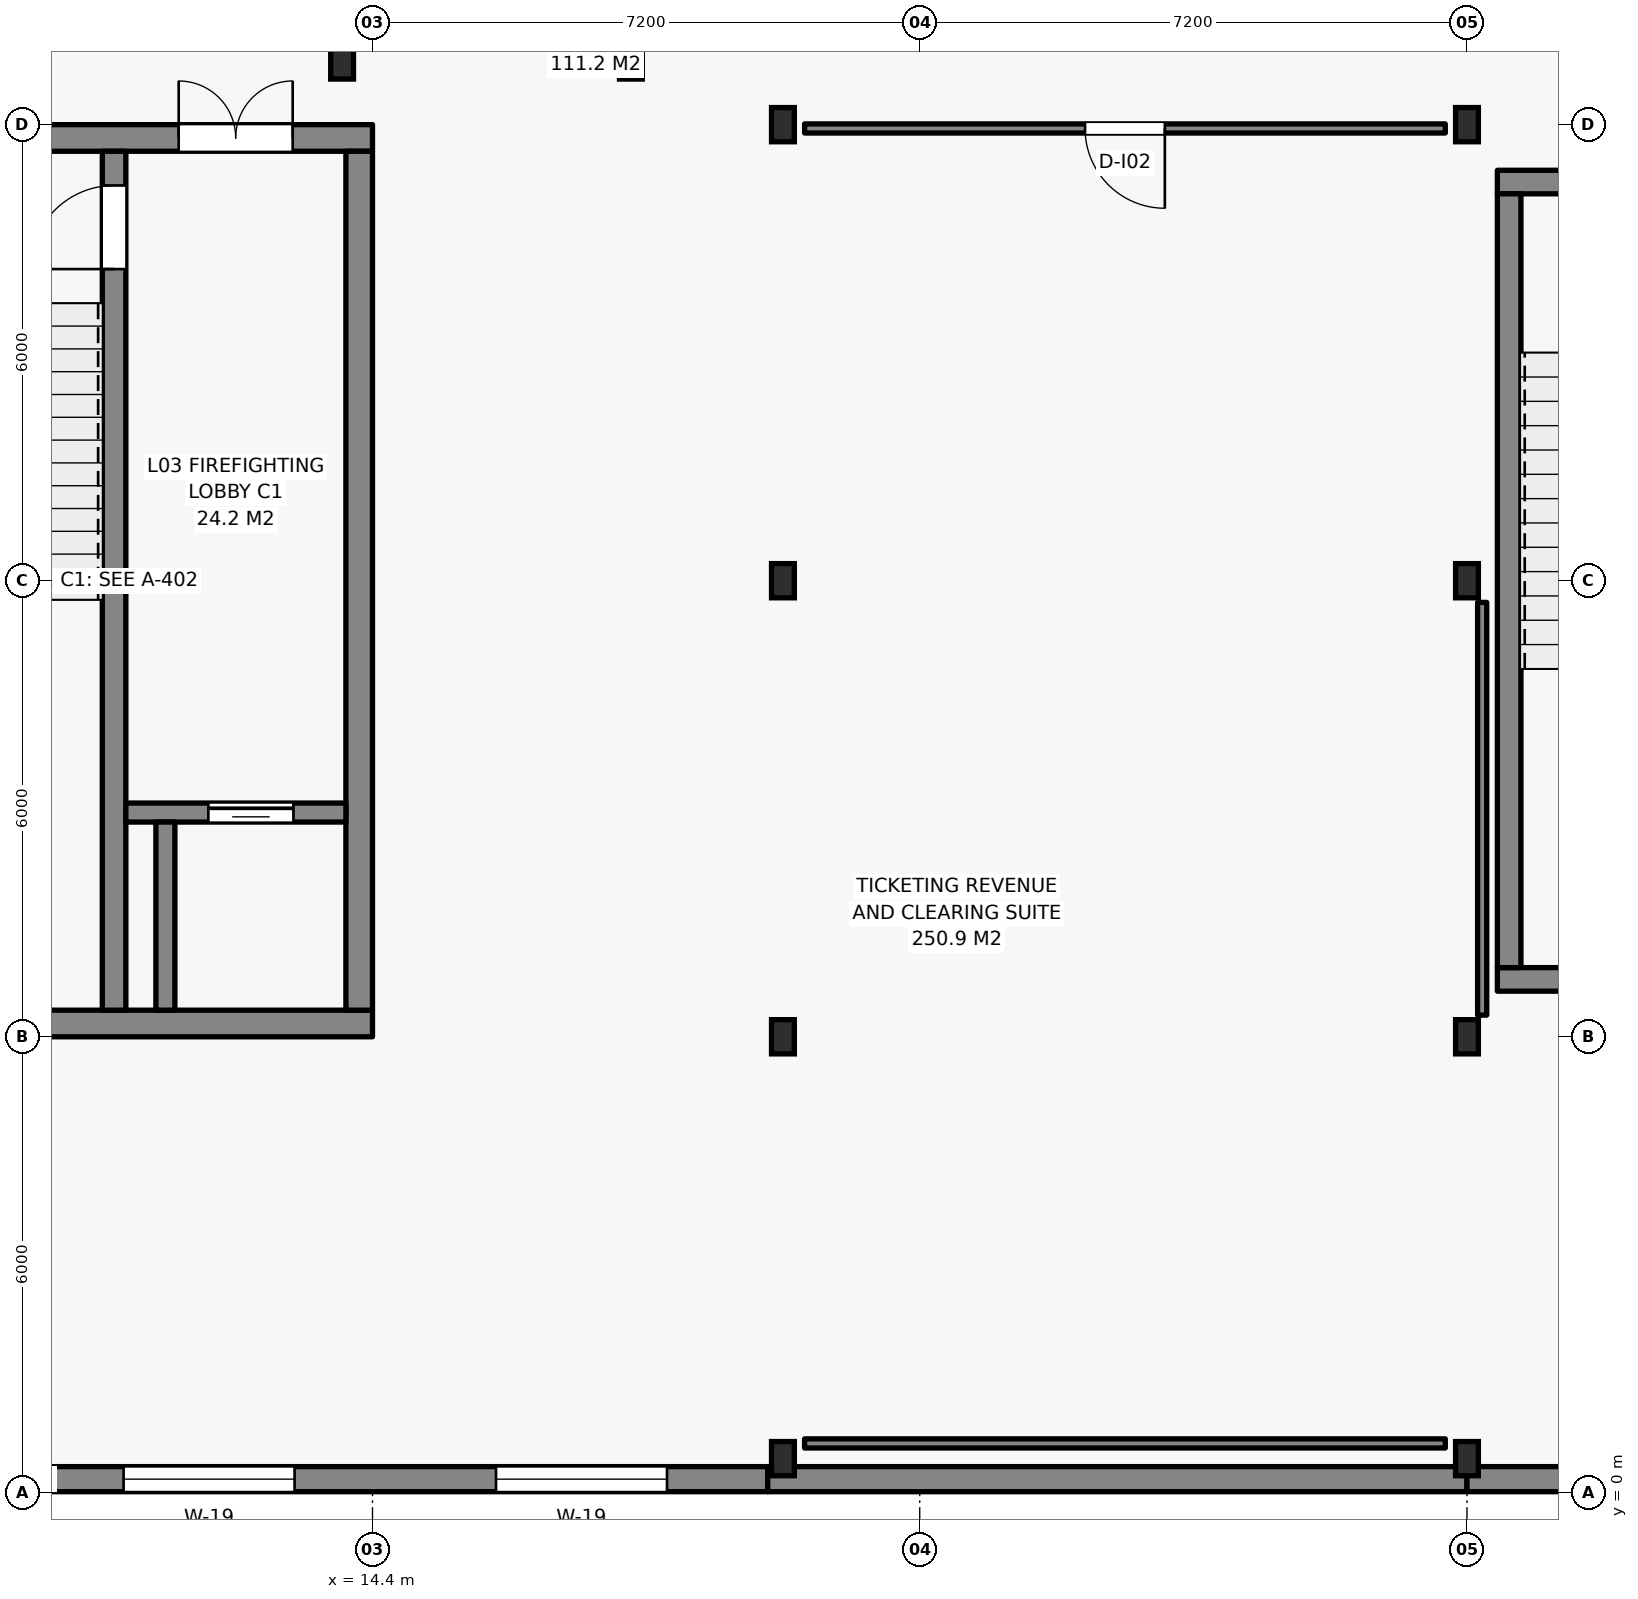
"""IFC4 building model, lengths in metres.
Left out: names, types, materials, properties, quantities, classifications, styles, units other than length and angle.
Written with IfcOpenShell. Run it as: python <this file> out.ifc"""

import sys

from ifc_helpers import new_model, si_unit, direction, frame, frame_2d, origin, origin_2d, place, context, subcontext, project, spatial, rectangle, i_section, extrude, element, fill, save


model = new_model("IFC4")
c1 = context("Model", 3, precision=1e-05, world=origin(), true_north=direction((0.0, 1.0)))
c2 = subcontext(c1, "Body", "Model", "MODEL_VIEW")
j1 = project(units=[si_unit("LENGTHUNIT", "METRE"), si_unit("PLANEANGLEUNIT", "RADIAN")], contexts=[c1])
p1 = place(None, origin())
s1 = spatial("IfcSite", under=j1, at=p1, CompositionType="ELEMENT")
p2 = place(p1, origin())
s2 = spatial("IfcBuilding", under=s1, at=p2, CompositionType="ELEMENT")
p3 = place(p2, frame((0.0, 0.0, 10.5)))
s3 = spatial("IfcBuildingStorey", under=s2, at=p3, CompositionType="ELEMENT", Elevation=10.5)
p4 = place(p3, frame((7.2, 6.175, 0.0), z_axis=(0.0, 0.0, 1.0), x_axis=(1.0, 0.0, 0.0)))
e1 = element("IfcWall", 1, at=p4, inside=s3, PredefinedType="SHEAR", context=c2, shape_type="SweptSolid", body=[
    extrude(rectangle(XDim=7.2, YDim=0.35, at=frame_2d((3.6, 0.0))), origin(), (0.0, 0.0, 1.0), 3.95),
])
p5 = place(p3, frame((7.2, 17.825, 0.0), z_axis=(0.0, 0.0, 1.0), x_axis=(1.0, 0.0, 0.0)))
e2 = element("IfcWall", 2, at=p5, inside=s3, PredefinedType="SHEAR", context=c2, shape_type="SweptSolid", body=[
    extrude(rectangle(XDim=7.2, YDim=0.35, at=frame_2d((3.6, 0.0))), origin(), (0.0, 0.0, 1.0), 3.95),
])
p6 = place(p5, frame((4.65, 0.0, 0.0)))
e3 = element("IfcOpeningElement", 3, at=p6, cuts=e2, PredefinedType="OPENING", context=c2, shape_type="SweptSolid", body=[
    extrude(rectangle(XDim=1.5, YDim=2.15, at=frame_2d((0.75, 1.075))), frame((0.0, 0.185, 0.0), z_axis=(0.0, -1.0, 0.0), x_axis=(1.0, 0.0, 0.0)), (0.0, 0.0, 1.0), 0.37),
])
p7 = place(p3, frame((14.225, 6.35, 0.0), z_axis=(0.0, 0.0, 1.0), x_axis=(0.0, 1.0, 0.0)))
e4 = element("IfcWall", 4, at=p7, inside=s3, PredefinedType="SHEAR", context=c2, shape_type="SweptSolid", body=[
    extrude(rectangle(XDim=11.3, YDim=0.35, at=frame_2d((5.65, 0.0))), origin(), (0.0, 0.0, 1.0), 3.95),
])
p8 = place(p3, frame((11.0, 6.35, 0.0), z_axis=(0.0, 0.0, 1.0), x_axis=(0.0, 1.0, 0.0)))
e5 = element("IfcWall", 5, at=p8, inside=s3, PredefinedType="SHEAR", context=c2, shape_type="SweptSolid", body=[
    extrude(rectangle(XDim=11.3, YDim=0.31, at=frame_2d((5.65, 0.0))), origin(), (0.0, 0.0, 1.0), 3.95),
])
p9 = place(p8, frame((9.75, 0.0, 0.0)))
e6 = element("IfcOpeningElement", 6, at=p9, cuts=e5, PredefinedType="OPENING", context=c2, shape_type="SweptSolid", body=[
    extrude(rectangle(XDim=1.1, YDim=2.15, at=frame_2d((0.55, 1.075))), frame((0.0, 0.165, 0.0), z_axis=(0.0, -1.0, 0.0), x_axis=(1.0, 0.0, 0.0)), (0.0, 0.0, 1.0), 0.33),
])
p10 = place(p3, frame((29.2, 6.755, 0.0), z_axis=(0.0, 0.0, 1.0), x_axis=(1.0, 0.0, 0.0)))
e7 = element("IfcWall", 7, at=p10, inside=s3, PredefinedType="SHEAR", context=c2, shape_type="SweptSolid", body=[
    extrude(rectangle(XDim=4.8, YDim=0.31, at=frame_2d((2.4, 0.0))), origin(), (0.0, 0.0, 1.0), 3.95),
])
p11 = place(p3, frame((29.2, 17.245, 0.0), z_axis=(0.0, 0.0, 1.0), x_axis=(1.0, 0.0, 0.0)))
e8 = element("IfcWall", 8, at=p11, inside=s3, PredefinedType="SHEAR", context=c2, shape_type="SweptSolid", body=[
    extrude(rectangle(XDim=4.8, YDim=0.31, at=frame_2d((2.4, 0.0))), origin(), (0.0, 0.0, 1.0), 3.95),
])
p12 = place(p11, frame((1.5, 0.0, 0.0)))
e9 = element("IfcOpeningElement", 9, at=p12, cuts=e8, PredefinedType="OPENING", context=c2, shape_type="SweptSolid", body=[
    extrude(rectangle(XDim=1.8, YDim=2.15, at=frame_2d((0.9, 1.075))), frame((0.0, 0.165, 0.0), z_axis=(0.0, -1.0, 0.0), x_axis=(1.0, 0.0, 0.0)), (0.0, 0.0, 1.0), 0.33),
])
p13 = place(p3, frame((29.355, 6.91, 0.0), z_axis=(0.0, 0.0, 1.0), x_axis=(0.0, 1.0, 0.0)))
e10 = element("IfcWall", 10, at=p13, inside=s3, PredefinedType="SHEAR", context=c2, shape_type="SweptSolid", body=[
    extrude(rectangle(XDim=10.18, YDim=0.31, at=frame_2d((5.09, 0.0))), origin(), (0.0, 0.0, 1.0), 3.95),
])
for number, where, z_axis, x_axis in (
    (11, (19.8, 0.45, 0.0), (0.0, 0.0, 1.0), (1.0, 0.0, 0.0)),
    (12, (19.8, 6.0, 0.0), (0.0, 0.0, 1.0), (1.0, 0.0, 0.0)),
    (13, (19.8, 12.0, 0.0), (0.0, 0.0, 1.0), (1.0, 0.0, 0.0)),
    (14, (19.8, 18.0, 0.0), (0.0, 0.0, 1.0), (1.0, 0.0, 0.0)),
    (15, (28.8, 0.45, 0.0), (0.0, 0.0, 1.0), (1.0, 0.0, 0.0)),
    (16, (28.8, 6.0, 0.0), (0.0, 0.0, 1.0), (1.0, 0.0, 0.0)),
    (17, (28.8, 12.0, 0.0), (0.0, 0.0, 1.0), (1.0, 0.0, 0.0)),
    (18, (28.8, 18.0, 0.0), (0.0, 0.0, 1.0), (1.0, 0.0, 0.0)),
):
    element("IfcColumn", number, at=place(p3, frame(where, z_axis=z_axis, x_axis=x_axis)), inside=s3, PredefinedType="COLUMN", context=c2, shape_type="SweptSolid", body=[
        extrude(i_section(OverallWidth=0.3, OverallDepth=0.45, WebThickness=0.014, FlangeThickness=0.026, FilletRadius=0.027, at=origin_2d()), origin(), (0.0, 0.0, 1.0), 4.2),
    ])
for number, where, z_axis, x_axis in (
    (19, (14.0, 18.8, 0.0), (0.0, 0.0, 1.0), (1.0, 0.0, 0.0)),
    (20, (17.8, 18.8, 0.0), (0.0, 0.0, 1.0), (1.0, 0.0, 0.0)),
):
    element("IfcColumn", number, at=place(p3, frame(where, z_axis=z_axis, x_axis=x_axis)), inside=s3, PredefinedType="COLUMN", context=c2, shape_type="SweptSolid", body=[
        extrude(i_section(OverallWidth=0.3, OverallDepth=0.4, WebThickness=0.013, FlangeThickness=0.024, FilletRadius=0.027, at=origin_2d()), origin(), (0.0, 0.0, 1.0), 4.2),
    ])
p14 = place(p3, frame((0.0, 0.18, 0.0), z_axis=(0.0, 0.0, 1.0), x_axis=(1.0, 0.0, 0.0)))
e21 = element("IfcWall", 21, at=p14, inside=s3, PredefinedType="SOLIDWALL", context=c2, shape_type="SweptSolid", body=[
    extrude(rectangle(XDim=19.6, YDim=0.33, at=frame_2d((9.8, 0.0))), origin(), (0.0, 0.0, 1.0), 3.705),
])
p15 = place(p14, frame((1.325, 0.0, 0.82)))
e22 = element("IfcOpeningElement", 22, at=p15, cuts=e21, PredefinedType="OPENING", context=c2, shape_type="SweptSolid", body=[
    extrude(rectangle(XDim=2.25, YDim=2.45, at=frame_2d((1.125, 1.225))), frame((0.0, 0.175, 0.0), z_axis=(0.0, -1.0, 0.0), x_axis=(1.0, 0.0, 0.0)), (0.0, 0.0, 1.0), 0.35),
])
p16 = place(p14, frame((6.225, 0.0, 0.82)))
e23 = element("IfcOpeningElement", 23, at=p16, cuts=e21, PredefinedType="OPENING", context=c2, shape_type="SweptSolid", body=[
    extrude(rectangle(XDim=2.25, YDim=2.45, at=frame_2d((1.125, 1.225))), frame((0.0, 0.175, 0.0), z_axis=(0.0, -1.0, 0.0), x_axis=(1.0, 0.0, 0.0)), (0.0, 0.0, 1.0), 0.35),
])
p17 = place(p14, frame((11.125, 0.0, 0.82)))
e24 = element("IfcOpeningElement", 24, at=p17, cuts=e21, PredefinedType="OPENING", context=c2, shape_type="SweptSolid", body=[
    extrude(rectangle(XDim=2.25, YDim=2.45, at=frame_2d((1.125, 1.225))), frame((0.0, 0.175, 0.0), z_axis=(0.0, -1.0, 0.0), x_axis=(1.0, 0.0, 0.0)), (0.0, 0.0, 1.0), 0.35),
])
p18 = place(p14, frame((16.025, 0.0, 0.82)))
e25 = element("IfcOpeningElement", 25, at=p18, cuts=e21, PredefinedType="OPENING", context=c2, shape_type="SweptSolid", body=[
    extrude(rectangle(XDim=2.25, YDim=2.45, at=frame_2d((1.125, 1.225))), frame((0.0, 0.175, 0.0), z_axis=(0.0, -1.0, 0.0), x_axis=(1.0, 0.0, 0.0)), (0.0, 0.0, 1.0), 0.35),
])
p19 = place(p3, frame((19.6, 0.18, 0.0), z_axis=(0.0, 0.0, 1.0), x_axis=(1.0, 0.0, 0.0)))
e26 = element("IfcWall", 26, at=p19, inside=s3, PredefinedType="SOLIDWALL", context=c2, shape_type="SweptSolid", body=[
    extrude(rectangle(XDim=9.2, YDim=0.33, at=frame_2d((4.6, 0.0))), origin(), (0.0, 0.0, 1.0), 3.425),
])
p20 = place(p3, frame((28.8, 0.18, 0.0), z_axis=(0.0, 0.0, 1.0), x_axis=(1.0, 0.0, 0.0)))
e27 = element("IfcWall", 27, at=p20, inside=s3, PredefinedType="SOLIDWALL", context=c2, shape_type="SweptSolid", body=[
    extrude(rectangle(XDim=7.2, YDim=0.33, at=frame_2d((3.6, 0.0))), origin(), (0.0, 0.0, 1.0), 3.95),
])
p21 = place(p20, frame((2.475, 0.0, 0.82)))
e28 = element("IfcOpeningElement", 28, at=p21, cuts=e27, PredefinedType="OPENING", context=c2, shape_type="SweptSolid", body=[
    extrude(rectangle(XDim=2.25, YDim=2.45, at=frame_2d((1.125, 1.225))), frame((0.0, 0.175, 0.0), z_axis=(0.0, -1.0, 0.0), x_axis=(1.0, 0.0, 0.0)), (0.0, 0.0, 1.0), 0.35),
])
p22 = place(p3, frame((11.155, 8.95, 0.0), z_axis=(0.0, 0.0, 1.0), x_axis=(1.0, 0.0, 0.0)))
e29 = element("IfcWall", 29, at=p22, inside=s3, PredefinedType="SHEAR", context=c2, shape_type="SweptSolid", body=[
    extrude(rectangle(XDim=2.895, YDim=0.25, at=frame_2d((1.448, 0.0))), origin(), (0.0, 0.0, 1.0), 3.95),
])
p23 = place(p22, frame((1.085, 0.0, 0.0)))
e30 = element("IfcOpeningElement", 30, at=p23, cuts=e29, PredefinedType="OPENING", context=c2, shape_type="SweptSolid", body=[
    extrude(rectangle(XDim=1.12, YDim=2.15, at=frame_2d((0.56, 1.075))), frame((0.0, 0.135, 0.0), z_axis=(0.0, -1.0, 0.0), x_axis=(1.0, 0.0, 0.0)), (0.0, 0.0, 1.0), 0.27),
])
p24 = place(p3, frame((11.675, 6.35, 0.0), z_axis=(0.0, 0.0, 1.0), x_axis=(0.0, 1.0, 0.0)))
e31 = element("IfcWall", 31, at=p24, inside=s3, PredefinedType="SHEAR", context=c2, shape_type="SweptSolid", body=[
    extrude(rectangle(XDim=2.475, YDim=0.25, at=frame_2d((1.237, 0.0))), origin(), (0.0, 0.0, 1.0), 3.95),
])
p25 = place(p3, frame((20.085, 0.65, 0.0), z_axis=(0.0, 0.0, 1.0), x_axis=(1.0, 0.0, 0.0)))
e32 = element("IfcWall", 32, at=p25, inside=s3, PredefinedType="PARTITIONING", context=c2, shape_type="SweptSolid", body=[
    extrude(rectangle(XDim=8.43, YDim=0.12, at=frame_2d((4.215, 0.0))), origin(), (0.0, 0.0, 1.0), 3.425),
])
p26 = place(p3, frame((29.0, 6.285, 0.0), z_axis=(0.0, 0.0, 1.0), x_axis=(0.0, 1.0, 0.0)))
e33 = element("IfcWall", 33, at=p26, inside=s3, PredefinedType="PARTITIONING", context=c2, shape_type="SweptSolid", body=[
    extrude(rectangle(XDim=5.43, YDim=0.12, at=frame_2d((2.715, 0.0))), origin(), (0.0, 0.0, 1.0), 3.565),
])
p27 = place(p3, frame((28.515, 17.95, 0.0), z_axis=(0.0, 0.0, 1.0), x_axis=(-1.0, 0.0, 0.0)))
e34 = element("IfcWall", 34, at=p27, inside=s3, PredefinedType="PARTITIONING", context=c2, shape_type="SweptSolid", body=[
    extrude(rectangle(XDim=8.43, YDim=0.12, at=frame_2d((4.215, 0.0))), origin(), (0.0, 0.0, 1.0), 3.425),
])
p28 = place(p27, frame((3.69, 0.0, 0.0)))
e35 = element("IfcOpeningElement", 35, at=p28, cuts=e34, PredefinedType="OPENING", context=c2, shape_type="SweptSolid", body=[
    extrude(rectangle(XDim=1.05, YDim=2.15, at=frame_2d((0.525, 1.075))), frame((0.0, 0.07, 0.0), z_axis=(0.0, -1.0, 0.0), x_axis=(1.0, 0.0, 0.0)), (0.0, 0.0, 1.0), 0.14),
])
p29 = place(p17, origin())
e36 = element("IfcWindow", 36, at=p29, inside=s3, PartitioningType="SINGLE_PANEL", PredefinedType="WINDOW", context=c2, shape_type="SweptSolid", body=[
    extrude(rectangle(XDim=2.25, YDim=2.45, at=frame_2d((1.125, 1.225))), frame((0.0, 0.03, 0.0), z_axis=(0.0, -1.0, 0.0), x_axis=(1.0, 0.0, 0.0)), (0.0, 0.0, 1.0), 0.06),
])
fill(e24, e36)
p30 = place(p18, origin())
e37 = element("IfcWindow", 37, at=p30, inside=s3, PartitioningType="SINGLE_PANEL", PredefinedType="WINDOW", context=c2, shape_type="SweptSolid", body=[
    extrude(rectangle(XDim=2.25, YDim=2.45, at=frame_2d((1.125, 1.225))), frame((0.0, 0.03, 0.0), z_axis=(0.0, -1.0, 0.0), x_axis=(1.0, 0.0, 0.0)), (0.0, 0.0, 1.0), 0.06),
])
fill(e25, e37)
p31 = place(p23, origin())
e38 = element("IfcDoor", 38, at=p31, inside=s3, OperationType="SLIDING_TO_LEFT", PredefinedType="DOOR", context=c2, shape_type="SweptSolid", body=[
    extrude(rectangle(XDim=1.12, YDim=2.15, at=frame_2d((0.56, 1.075))), frame((0.0, 0.025, 0.0), z_axis=(0.0, -1.0, 0.0), x_axis=(1.0, 0.0, 0.0)), (0.0, 0.0, 1.0), 0.05),
])
fill(e30, e38)
p32 = place(p6, origin())
e39 = element("IfcDoor", 39, at=p32, inside=s3, OperationType="DOUBLE_DOOR_SINGLE_SWING", PredefinedType="DOOR", context=c2, shape_type="SweptSolid", body=[
    extrude(rectangle(XDim=1.5, YDim=2.15, at=frame_2d((0.75, 1.075))), frame((0.0, 0.025, 0.0), z_axis=(0.0, -1.0, 0.0), x_axis=(1.0, 0.0, 0.0)), (0.0, 0.0, 1.0), 0.05),
])
fill(e3, e39)
p33 = place(p9, origin())
e40 = element("IfcDoor", 40, at=p33, inside=s3, OperationType="SINGLE_SWING_LEFT", PredefinedType="DOOR", context=c2, shape_type="SweptSolid", body=[
    extrude(rectangle(XDim=1.1, YDim=2.15, at=frame_2d((0.55, 1.075))), frame((0.0, 0.025, 0.0), z_axis=(0.0, -1.0, 0.0), x_axis=(1.0, 0.0, 0.0)), (0.0, 0.0, 1.0), 0.05),
])
fill(e6, e40)
p34 = place(p28, origin())
e41 = element("IfcDoor", 41, at=p34, inside=s3, OperationType="SINGLE_SWING_LEFT", PredefinedType="DOOR", context=c2, shape_type="SweptSolid", body=[
    extrude(rectangle(XDim=1.05, YDim=2.15, at=frame_2d((0.525, 1.075))), frame((0.0, 0.025, 0.0), z_axis=(0.0, -1.0, 0.0), x_axis=(1.0, 0.0, 0.0)), (0.0, 0.0, 1.0), 0.05),
])
fill(e35, e41)
save(model, sys.argv[1])
